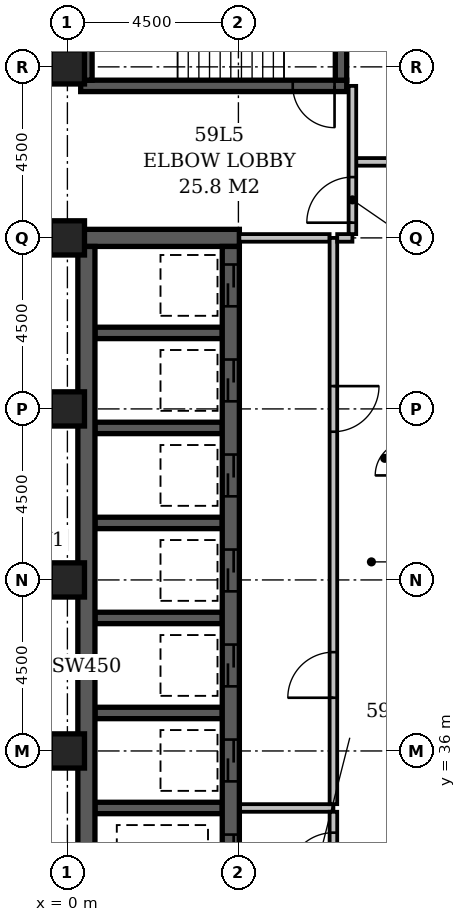
"""IFC4 building model, lengths in metres.
Left out: names, types, materials, properties, quantities, classifications, styles, units other than length and angle.
Written with IfcOpenShell. Run it as: python <this file> out.ifc"""

import sys

from ifc_helpers import new_model, si_unit, direction, frame, frame_2d, origin, origin_2d, place, context, subcontext, project, spatial, rectangle, extrude, element, fill, save


model = new_model("IFC4")
c1 = context("Model", 3, precision=1e-05, world=origin(), true_north=direction((0.0, 1.0)))
c2 = subcontext(c1, "Body", "Model", "MODEL_VIEW")
j1 = project(units=[si_unit("LENGTHUNIT", "METRE"), si_unit("PLANEANGLEUNIT", "RADIAN")], contexts=[c1])
p1 = place(None, origin())
s1 = spatial("IfcSite", under=j1, at=p1, CompositionType="ELEMENT")
p2 = place(p1, origin())
s2 = spatial("IfcBuilding", under=s1, at=p2, CompositionType="ELEMENT")
p3 = place(p2, frame((0.0, 0.0, 229.4)))
s3 = spatial("IfcBuildingStorey", under=s2, at=p3, CompositionType="ELEMENT", Elevation=229.4)
p4 = place(p3, frame((0.275, 49.5, -0.3), z_axis=(0.0, 0.0, 1.0), x_axis=(1.0, 0.0, 0.0)))
e1 = element("IfcWall", 1, at=p4, inside=s3, PredefinedType="SHEAR", context=c2, shape_type="SweptSolid", body=[
    extrude(rectangle(XDim=4.25, YDim=0.45, at=frame_2d((2.125, 0.0))), origin(), (0.0, 0.0, 1.0), 3.55),
])
p5 = place(p3, frame((0.35, 53.5, -0.3), z_axis=(0.0, 0.0, 1.0), x_axis=(1.0, 0.0, 0.0)))
e2 = element("IfcWall", 2, at=p5, inside=s3, PredefinedType="SHEAR", context=c2, shape_type="SweptSolid", body=[
    extrude(rectangle(XDim=7.0, YDim=0.3, at=frame_2d((3.5, 0.0))), origin(), (0.0, 0.0, 1.0), 3.55),
])
p6 = place(p5, frame((5.58, 0.0, 0.3)))
e3 = element("IfcOpeningElement", 3, at=p6, cuts=e2, PredefinedType="OPENING", context=c2, shape_type="SweptSolid", body=[
    extrude(rectangle(XDim=1.1, YDim=2.1, at=frame_2d((0.55, 1.05))), frame((0.0, 0.162, 0.0), z_axis=(0.0, -1.0, 0.0), x_axis=(1.0, 0.0, 0.0)), (0.0, 0.0, 1.0), 0.324),
])
p7 = place(p3, frame((0.5, 27.15, -0.3), z_axis=(0.0, 0.0, 1.0), x_axis=(0.0, 1.0, 0.0)))
e4 = element("IfcWall", 4, at=p7, inside=s3, PredefinedType="SHEAR", context=c2, shape_type="SweptSolid", body=[
    extrude(rectangle(XDim=22.125, YDim=0.45, at=frame_2d((11.062, 0.0))), origin(), (0.0, 0.0, 1.0), 3.55),
])
p8 = place(p3, frame((0.5, 53.65, -0.3), z_axis=(0.0, 0.0, 1.0), x_axis=(0.0, 1.0, 0.0)))
e5 = element("IfcWall", 5, at=p8, inside=s3, PredefinedType="SHEAR", context=c2, shape_type="SweptSolid", body=[
    extrude(rectangle(XDim=4.2, YDim=0.3, at=frame_2d((2.1, 0.0))), origin(), (0.0, 0.0, 1.0), 3.55),
])
for number, where, z_axis, x_axis in (
    (6, (0.725, 34.5, -0.3), (0.0, 0.0, 1.0), (1.0, 0.0, 0.0)),
    (7, (0.725, 37.0, -0.3), (0.0, 0.0, 1.0), (1.0, 0.0, 0.0)),
    (8, (0.725, 39.5, -0.3), (0.0, 0.0, 1.0), (1.0, 0.0, 0.0)),
    (9, (0.725, 42.0, -0.3), (0.0, 0.0, 1.0), (1.0, 0.0, 0.0)),
    (10, (0.725, 44.5, -0.3), (0.0, 0.0, 1.0), (1.0, 0.0, 0.0)),
    (11, (0.725, 47.0, -0.3), (0.0, 0.0, 1.0), (1.0, 0.0, 0.0)),
):
    element("IfcWall", number, at=place(p3, frame(where, z_axis=z_axis, x_axis=x_axis)), inside=s3, PredefinedType="SHEAR", context=c2, shape_type="SweptSolid", body=[
        extrude(rectangle(XDim=3.35, YDim=0.3, at=frame_2d((1.675, 0.0))), origin(), (0.0, 0.0, 1.0), 3.55),
    ])
p9 = place(p3, frame((4.3, 27.15, -0.3), z_axis=(0.0, 0.0, 1.0), x_axis=(0.0, 1.0, 0.0)))
e12 = element("IfcWall", 12, at=p9, inside=s3, PredefinedType="SHEAR", context=c2, shape_type="SweptSolid", body=[
    extrude(rectangle(XDim=22.125, YDim=0.45, at=frame_2d((11.062, 0.0))), origin(), (0.0, 0.0, 1.0), 3.55),
])
p10 = place(p9, frame((3.05, 0.0, 0.3)))
e13 = element("IfcOpeningElement", 13, at=p10, cuts=e12, PredefinedType="OPENING", context=c2, shape_type="SweptSolid", body=[
    extrude(rectangle(XDim=1.1, YDim=2.1, at=frame_2d((0.55, 1.05))), frame((0.0, 0.237, 0.0), z_axis=(0.0, -1.0, 0.0), x_axis=(1.0, 0.0, 0.0)), (0.0, 0.0, 1.0), 0.474),
])
p11 = place(p9, frame((0.55, 0.0, 0.3)))
e14 = element("IfcOpeningElement", 14, at=p11, cuts=e12, PredefinedType="OPENING", context=c2, shape_type="SweptSolid", body=[
    extrude(rectangle(XDim=1.1, YDim=2.1, at=frame_2d((0.55, 1.05))), frame((0.0, 0.237, 0.0), z_axis=(0.0, -1.0, 0.0), x_axis=(1.0, 0.0, 0.0)), (0.0, 0.0, 1.0), 0.474),
])
p12 = place(p9, frame((20.55, 0.0, 0.3)))
e15 = element("IfcOpeningElement", 15, at=p12, cuts=e12, PredefinedType="OPENING", context=c2, shape_type="SweptSolid", body=[
    extrude(rectangle(XDim=1.1, YDim=2.1, at=frame_2d((0.55, 1.05))), frame((0.0, 0.237, 0.0), z_axis=(0.0, -1.0, 0.0), x_axis=(1.0, 0.0, 0.0)), (0.0, 0.0, 1.0), 0.474),
])
p13 = place(p9, frame((18.05, 0.0, 0.3)))
e16 = element("IfcOpeningElement", 16, at=p13, cuts=e12, PredefinedType="OPENING", context=c2, shape_type="SweptSolid", body=[
    extrude(rectangle(XDim=1.1, YDim=2.1, at=frame_2d((0.55, 1.05))), frame((0.0, 0.237, 0.0), z_axis=(0.0, -1.0, 0.0), x_axis=(1.0, 0.0, 0.0)), (0.0, 0.0, 1.0), 0.474),
])
p14 = place(p9, frame((15.55, 0.0, 0.3)))
e17 = element("IfcOpeningElement", 17, at=p14, cuts=e12, PredefinedType="OPENING", context=c2, shape_type="SweptSolid", body=[
    extrude(rectangle(XDim=1.1, YDim=2.1, at=frame_2d((0.55, 1.05))), frame((0.0, 0.237, 0.0), z_axis=(0.0, -1.0, 0.0), x_axis=(1.0, 0.0, 0.0)), (0.0, 0.0, 1.0), 0.474),
])
p15 = place(p9, frame((13.05, 0.0, 0.3)))
e18 = element("IfcOpeningElement", 18, at=p15, cuts=e12, PredefinedType="OPENING", context=c2, shape_type="SweptSolid", body=[
    extrude(rectangle(XDim=1.1, YDim=2.1, at=frame_2d((0.55, 1.05))), frame((0.0, 0.237, 0.0), z_axis=(0.0, -1.0, 0.0), x_axis=(1.0, 0.0, 0.0)), (0.0, 0.0, 1.0), 0.474),
])
p16 = place(p9, frame((10.55, 0.0, 0.3)))
e19 = element("IfcOpeningElement", 19, at=p16, cuts=e12, PredefinedType="OPENING", context=c2, shape_type="SweptSolid", body=[
    extrude(rectangle(XDim=1.1, YDim=2.1, at=frame_2d((0.55, 1.05))), frame((0.0, 0.237, 0.0), z_axis=(0.0, -1.0, 0.0), x_axis=(1.0, 0.0, 0.0)), (0.0, 0.0, 1.0), 0.474),
])
p17 = place(p9, frame((8.05, 0.0, 0.3)))
e20 = element("IfcOpeningElement", 20, at=p17, cuts=e12, PredefinedType="OPENING", context=c2, shape_type="SweptSolid", body=[
    extrude(rectangle(XDim=1.1, YDim=2.1, at=frame_2d((0.55, 1.05))), frame((0.0, 0.237, 0.0), z_axis=(0.0, -1.0, 0.0), x_axis=(1.0, 0.0, 0.0)), (0.0, 0.0, 1.0), 0.474),
])
p18 = place(p9, frame((5.55, 0.0, 0.3)))
e21 = element("IfcOpeningElement", 21, at=p18, cuts=e12, PredefinedType="OPENING", context=c2, shape_type="SweptSolid", body=[
    extrude(rectangle(XDim=1.1, YDim=2.1, at=frame_2d((0.55, 1.05))), frame((0.0, 0.237, 0.0), z_axis=(0.0, -1.0, 0.0), x_axis=(1.0, 0.0, 0.0)), (0.0, 0.0, 1.0), 0.474),
])
p19 = place(p3, frame((7.2, 53.65, -0.3), z_axis=(0.0, 0.0, 1.0), x_axis=(0.0, 1.0, 0.0)))
e22 = element("IfcWall", 22, at=p19, inside=s3, PredefinedType="SHEAR", context=c2, shape_type="SweptSolid", body=[
    extrude(rectangle(XDim=4.2, YDim=0.3, at=frame_2d((2.1, 0.0))), origin(), (0.0, 0.0, 1.0), 3.55),
])
for number, where, z_axis, x_axis in (
    (23, (0.0, 36.0, -0.3), (0.0, 0.0, 1.0), (1.0, 0.0, 0.0)),
    (24, (0.0, 40.5, -0.3), (0.0, 0.0, 1.0), (1.0, 0.0, 0.0)),
    (25, (0.0, 45.0, -0.3), (0.0, 0.0, 1.0), (1.0, 0.0, 0.0)),
    (26, (0.0, 49.5, -0.3), (0.0, 0.0, 1.0), (1.0, 0.0, 0.0)),
    (27, (0.0, 54.0, -0.3), (0.0, 0.0, 1.0), (1.0, 0.0, 0.0)),
):
    element("IfcColumn", number, at=place(p3, frame(where, z_axis=z_axis, x_axis=x_axis)), inside=s3, PredefinedType="COLUMN", context=c2, shape_type="SweptSolid", body=[
        extrude(rectangle(XDim=0.9, YDim=0.9, at=origin_2d()), origin(), (0.0, 0.0, 1.0), 3.55),
    ])
p20 = place(p3, frame((4.545, 34.5, 0.0), z_axis=(0.0, 0.0, 1.0), x_axis=(1.0, 0.0, 0.0)))
e28 = element("IfcWall", 28, at=p20, inside=s3, PredefinedType="PARTITIONING", context=c2, shape_type="SweptSolid", body=[
    extrude(rectangle(XDim=2.455, YDim=0.2, at=frame_2d((1.228, 0.0))), origin(), (0.0, 0.0, 1.0), 3.25),
])
p21 = place(p3, frame((7.0, 34.6, 0.0), z_axis=(0.0, 0.0, 1.0), x_axis=(0.0, 1.0, 0.0)))
e29 = element("IfcWall", 29, at=p21, inside=s3, PredefinedType="PARTITIONING", context=c2, shape_type="SweptSolid", body=[
    extrude(rectangle(XDim=14.9, YDim=0.2, at=frame_2d((7.45, 0.0))), origin(), (0.0, 0.0, 1.0), 3.25),
])
p22 = place(p21, frame((2.8, 0.0, 0.0)))
e30 = element("IfcOpeningElement", 30, at=p22, cuts=e29, PredefinedType="OPENING", context=c2, shape_type="SweptSolid", body=[
    extrude(rectangle(XDim=1.2, YDim=2.1, at=frame_2d((0.6, 1.05))), frame((0.0, 0.112, 0.0), z_axis=(0.0, -1.0, 0.0), x_axis=(1.0, 0.0, 0.0)), (0.0, 0.0, 1.0), 0.224),
])
p23 = place(p21, frame((9.8, 0.0, 0.0)))
e31 = element("IfcOpeningElement", 31, at=p23, cuts=e29, PredefinedType="OPENING", context=c2, shape_type="SweptSolid", body=[
    extrude(rectangle(XDim=1.2, YDim=2.1, at=frame_2d((0.6, 1.05))), frame((0.0, 0.112, 0.0), z_axis=(0.0, -1.0, 0.0), x_axis=(1.0, 0.0, 0.0)), (0.0, 0.0, 1.0), 0.224),
])
p24 = place(p3, frame((4.525, 49.5, 0.0), z_axis=(0.0, 0.0, 1.0), x_axis=(1.0, 0.0, 0.0)))
e32 = element("IfcWall", 32, at=p24, inside=s3, PredefinedType="PARTITIONING", context=c2, shape_type="SweptSolid", body=[
    extrude(rectangle(XDim=2.375, YDim=0.2, at=frame_2d((1.188, 0.0))), origin(), (0.0, 0.0, 1.0), 3.25),
])
p25 = place(p3, frame((7.0, 32.1, 0.0), z_axis=(0.0, 0.0, 1.0), x_axis=(0.0, 1.0, 0.0)))
e33 = element("IfcWall", 33, at=p25, inside=s3, PredefinedType="PARTITIONING", context=c2, shape_type="SweptSolid", body=[
    extrude(rectangle(XDim=2.3, YDim=0.2, at=frame_2d((1.15, 0.0))), origin(), (0.0, 0.0, 1.0), 3.25),
])
p26 = place(p25, frame((0.55, 0.0, 0.0)))
e34 = element("IfcOpeningElement", 34, at=p26, cuts=e33, PredefinedType="OPENING", context=c2, shape_type="SweptSolid", body=[
    extrude(rectangle(XDim=1.2, YDim=2.1, at=frame_2d((0.6, 1.05))), frame((0.0, 0.112, 0.0), z_axis=(0.0, -1.0, 0.0), x_axis=(1.0, 0.0, 0.0)), (0.0, 0.0, 1.0), 0.224),
])
p27 = place(p3, frame((7.1, 49.5, 0.0), z_axis=(0.0, 0.0, 1.0), x_axis=(1.0, 0.0, 0.0)))
e35 = element("IfcWall", 35, at=p27, inside=s3, PredefinedType="PARTITIONING", context=c2, shape_type="SweptSolid", body=[
    extrude(rectangle(XDim=0.4, YDim=0.2, at=frame_2d((0.2, 0.0))), origin(), (0.0, 0.0, 1.0), 3.25),
])
p28 = place(p3, frame((7.5, 49.6, 0.0), z_axis=(0.0, 0.0, 1.0), x_axis=(0.0, 1.0, 0.0)))
e36 = element("IfcWall", 36, at=p28, inside=s3, PredefinedType="PARTITIONING", context=c2, shape_type="SweptSolid", body=[
    extrude(rectangle(XDim=3.9, YDim=0.2, at=frame_2d((1.95, 0.0))), origin(), (0.0, 0.0, 1.0), 3.25),
])
p29 = place(p28, frame((0.3, 0.0, 0.0)))
e37 = element("IfcOpeningElement", 37, at=p29, cuts=e36, PredefinedType="OPENING", context=c2, shape_type="SweptSolid", body=[
    extrude(rectangle(XDim=1.2, YDim=2.1, at=frame_2d((0.6, 1.05))), frame((0.0, 0.112, 0.0), z_axis=(0.0, -1.0, 0.0), x_axis=(1.0, 0.0, 0.0)), (0.0, 0.0, 1.0), 0.224),
])
p30 = place(p3, frame((7.6, 51.5, 0.0), z_axis=(0.0, 0.0, 1.0), x_axis=(1.0, 0.0, 0.0)))
e38 = element("IfcWall", 38, at=p30, inside=s3, PredefinedType="PARTITIONING", context=c2, shape_type="SweptSolid", body=[
    extrude(rectangle(XDim=15.3, YDim=0.2, at=frame_2d((7.65, 0.0))), origin(), (0.0, 0.0, 1.0), 3.25),
])
p31 = place(p30, frame((3.55, 0.0, 0.0)))
e39 = element("IfcOpeningElement", 39, at=p31, cuts=e38, PredefinedType="OPENING", context=c2, shape_type="SweptSolid", body=[
    extrude(rectangle(XDim=0.9, YDim=2.1, at=frame_2d((0.45, 1.05))), frame((0.0, 0.112, 0.0), z_axis=(0.0, -1.0, 0.0), x_axis=(1.0, 0.0, 0.0)), (0.0, 0.0, 1.0), 0.224),
])
p32 = place(p30, frame((11.3, 0.0, 0.0)))
e40 = element("IfcOpeningElement", 40, at=p32, cuts=e38, PredefinedType="OPENING", context=c2, shape_type="SweptSolid", body=[
    extrude(rectangle(XDim=0.9, YDim=2.1, at=frame_2d((0.45, 1.05))), frame((0.0, 0.112, 0.0), z_axis=(0.0, -1.0, 0.0), x_axis=(1.0, 0.0, 0.0)), (0.0, 0.0, 1.0), 0.224),
])
p33 = place(p29, origin())
e41 = element("IfcDoor", 41, at=p33, inside=s3, OperationType="SINGLE_SWING_LEFT", PredefinedType="DOOR", context=c2, shape_type="SweptSolid", body=[
    extrude(rectangle(XDim=1.2, YDim=2.1, at=frame_2d((0.6, 1.05))), frame((0.0, 0.025, 0.0), z_axis=(0.0, -1.0, 0.0), x_axis=(1.0, 0.0, 0.0)), (0.0, 0.0, 1.0), 0.05),
])
fill(e37, e41)
p34 = place(p12, origin())
e42 = element("IfcDoor", 42, at=p34, inside=s3, OperationType="SLIDING_TO_LEFT", PredefinedType="DOOR", context=c2, shape_type="SweptSolid", body=[
    extrude(rectangle(XDim=1.1, YDim=2.1, at=frame_2d((0.55, 1.05))), frame((0.0, 0.025, 0.0), z_axis=(0.0, -1.0, 0.0), x_axis=(1.0, 0.0, 0.0)), (0.0, 0.0, 1.0), 0.05),
])
fill(e15, e42)
p35 = place(p13, origin())
e43 = element("IfcDoor", 43, at=p35, inside=s3, OperationType="SLIDING_TO_LEFT", PredefinedType="DOOR", context=c2, shape_type="SweptSolid", body=[
    extrude(rectangle(XDim=1.1, YDim=2.1, at=frame_2d((0.55, 1.05))), frame((0.0, 0.025, 0.0), z_axis=(0.0, -1.0, 0.0), x_axis=(1.0, 0.0, 0.0)), (0.0, 0.0, 1.0), 0.05),
])
fill(e16, e43)
p36 = place(p14, origin())
e44 = element("IfcDoor", 44, at=p36, inside=s3, OperationType="SLIDING_TO_LEFT", PredefinedType="DOOR", context=c2, shape_type="SweptSolid", body=[
    extrude(rectangle(XDim=1.1, YDim=2.1, at=frame_2d((0.55, 1.05))), frame((0.0, 0.025, 0.0), z_axis=(0.0, -1.0, 0.0), x_axis=(1.0, 0.0, 0.0)), (0.0, 0.0, 1.0), 0.05),
])
fill(e17, e44)
p37 = place(p15, origin())
e45 = element("IfcDoor", 45, at=p37, inside=s3, OperationType="SLIDING_TO_LEFT", PredefinedType="DOOR", context=c2, shape_type="SweptSolid", body=[
    extrude(rectangle(XDim=1.1, YDim=2.1, at=frame_2d((0.55, 1.05))), frame((0.0, 0.025, 0.0), z_axis=(0.0, -1.0, 0.0), x_axis=(1.0, 0.0, 0.0)), (0.0, 0.0, 1.0), 0.05),
])
fill(e18, e45)
p38 = place(p16, origin())
e46 = element("IfcDoor", 46, at=p38, inside=s3, OperationType="SLIDING_TO_LEFT", PredefinedType="DOOR", context=c2, shape_type="SweptSolid", body=[
    extrude(rectangle(XDim=1.1, YDim=2.1, at=frame_2d((0.55, 1.05))), frame((0.0, 0.025, 0.0), z_axis=(0.0, -1.0, 0.0), x_axis=(1.0, 0.0, 0.0)), (0.0, 0.0, 1.0), 0.05),
])
fill(e19, e46)
p39 = place(p17, origin())
e47 = element("IfcDoor", 47, at=p39, inside=s3, OperationType="SLIDING_TO_LEFT", PredefinedType="DOOR", context=c2, shape_type="SweptSolid", body=[
    extrude(rectangle(XDim=1.1, YDim=2.1, at=frame_2d((0.55, 1.05))), frame((0.0, 0.025, 0.0), z_axis=(0.0, -1.0, 0.0), x_axis=(1.0, 0.0, 0.0)), (0.0, 0.0, 1.0), 0.05),
])
fill(e20, e47)
p40 = place(p22, origin())
e48 = element("IfcDoor", 48, at=p40, inside=s3, OperationType="SINGLE_SWING_LEFT", PredefinedType="DOOR", context=c2, shape_type="SweptSolid", body=[
    extrude(rectangle(XDim=1.2, YDim=2.1, at=frame_2d((0.6, 1.05))), frame((0.0, 0.025, 0.0), z_axis=(0.0, -1.0, 0.0), x_axis=(1.0, 0.0, 0.0)), (0.0, 0.0, 1.0), 0.05),
])
fill(e30, e48)
p41 = place(p23, origin())
e49 = element("IfcDoor", 49, at=p41, inside=s3, OperationType="SINGLE_SWING_RIGHT", PredefinedType="DOOR", context=c2, shape_type="SweptSolid", body=[
    extrude(rectangle(XDim=1.2, YDim=2.1, at=frame_2d((0.6, 1.05))), frame((0.0, 0.025, 0.0), z_axis=(0.0, -1.0, 0.0), x_axis=(1.0, 0.0, 0.0)), (0.0, 0.0, 1.0), 0.05),
])
fill(e31, e49)
p42 = place(p26, origin())
e50 = element("IfcDoor", 50, at=p42, inside=s3, OperationType="SINGLE_SWING_LEFT", PredefinedType="DOOR", context=c2, shape_type="SweptSolid", body=[
    extrude(rectangle(XDim=1.2, YDim=2.1, at=frame_2d((0.6, 1.05))), frame((0.0, 0.025, 0.0), z_axis=(0.0, -1.0, 0.0), x_axis=(1.0, 0.0, 0.0)), (0.0, 0.0, 1.0), 0.05),
])
fill(e34, e50)
p43 = place(p18, origin())
e51 = element("IfcDoor", 51, at=p43, inside=s3, OperationType="SLIDING_TO_LEFT", PredefinedType="DOOR", context=c2, shape_type="SweptSolid", body=[
    extrude(rectangle(XDim=1.1, YDim=2.1, at=frame_2d((0.55, 1.05))), frame((0.0, 0.025, 0.0), z_axis=(0.0, -1.0, 0.0), x_axis=(1.0, 0.0, 0.0)), (0.0, 0.0, 1.0), 0.05),
])
fill(e21, e51)
p44 = place(p6, origin())
e52 = element("IfcDoor", 52, at=p44, inside=s3, OperationType="SINGLE_SWING_RIGHT", PredefinedType="DOOR", context=c2, shape_type="SweptSolid", body=[
    extrude(rectangle(XDim=1.1, YDim=2.1, at=frame_2d((0.55, 1.05))), frame((0.0, 0.025, 0.0), z_axis=(0.0, -1.0, 0.0), x_axis=(1.0, 0.0, 0.0)), (0.0, 0.0, 1.0), 0.05),
])
fill(e3, e52)
save(model, sys.argv[1])
